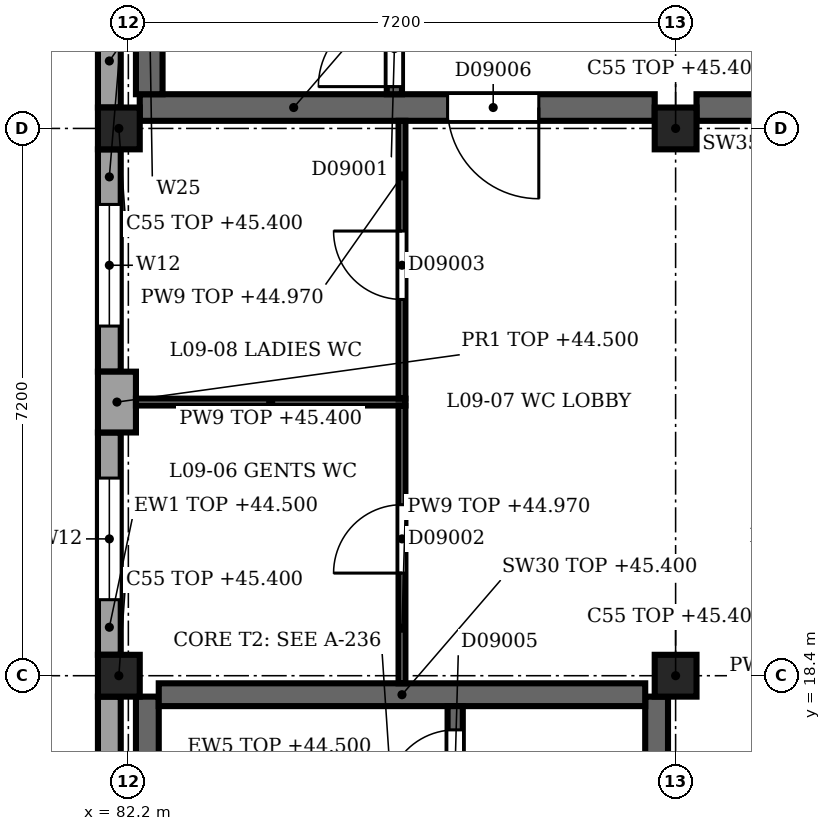
"""IFC4 building model, lengths in metres.
Left out: names, types, materials, properties, quantities, classifications, styles, units other than length and angle.
Written with IfcOpenShell. Run it as: python <this file> out.ifc"""

import sys

from ifc_helpers import new_model, si_unit, direction, frame, frame_2d, origin, origin_2d, place, context, subcontext, project, spatial, rectangle, extrude, element, fill, save


model = new_model("IFC4")
c1 = context("Model", 3, precision=1e-05, world=origin(), true_north=direction((0.0, 1.0)))
c2 = subcontext(c1, "Body", "Model", "MODEL_VIEW")
j1 = project(units=[si_unit("LENGTHUNIT", "METRE"), si_unit("PLANEANGLEUNIT", "RADIAN")], contexts=[c1])
p1 = place(None, origin())
s1 = spatial("IfcSite", under=j1, at=p1, CompositionType="ELEMENT")
p2 = place(p1, origin())
s2 = spatial("IfcBuilding", under=s1, at=p2, CompositionType="ELEMENT")
p3 = place(p2, frame((0.0, 0.0, 41.4)))
s3 = spatial("IfcBuildingStorey", under=s2, at=p3, CompositionType="ELEMENT", Elevation=41.4)
for number, where, z_axis, x_axis in (
    (1, (82.075, 18.4, 0.0), (0.0, 0.0, 1.0), (1.0, 0.0, 0.0)),
    (2, (82.075, 25.6, 0.0), (0.0, 0.0, 1.0), (1.0, 0.0, 0.0)),
    (3, (89.4, 18.4, 0.0), (0.0, 0.0, 1.0), (1.0, 0.0, 0.0)),
    (4, (89.4, 25.6, 0.0), (0.0, 0.0, 1.0), (1.0, 0.0, 0.0)),
):
    element("IfcColumn", number, at=place(p3, frame(where, z_axis=z_axis, x_axis=x_axis)), inside=s3, PredefinedType="COLUMN", context=c2, shape_type="SweptSolid", body=[
        extrude(rectangle(XDim=0.55, YDim=0.55, at=origin_2d()), origin(), (0.0, 0.0, 1.0), 4.0),
    ])
p4 = place(p3, frame((82.05, 21.6, 0.0), z_axis=(0.0, 0.0, 1.0), x_axis=(0.0, 1.0, 0.0)))
e5 = element("IfcWall", 5, at=p4, inside=s3, PredefinedType="SOLIDWALL", context=c2, shape_type="SweptSolid", body=[
    extrude(rectangle(XDim=0.8, YDim=0.5, at=frame_2d((0.4, 0.0))), origin(), (0.0, 0.0, 1.0), 3.1),
])
p5 = place(p3, frame((81.95, 15.2, 0.0), z_axis=(0.0, 0.0, 1.0), x_axis=(0.0, 1.0, 0.0)))
e6 = element("IfcWall", 6, at=p5, inside=s3, PredefinedType="SOLIDWALL", context=c2, shape_type="SweptSolid", body=[
    extrude(rectangle(XDim=2.925, YDim=0.3, at=frame_2d((1.462, 0.0))), origin(), (0.0, 0.0, 1.0), 3.1),
])
p6 = place(p3, frame((81.95, 18.675, 0.0), z_axis=(0.0, 0.0, 1.0), x_axis=(0.0, 1.0, 0.0)))
e7 = element("IfcWall", 7, at=p6, inside=s3, PredefinedType="SOLIDWALL", context=c2, shape_type="SweptSolid", body=[
    extrude(rectangle(XDim=2.925, YDim=0.3, at=frame_2d((1.462, 0.0))), origin(), (0.0, 0.0, 1.0), 3.1),
])
p7 = place(p6, frame((0.725, 0.0, 0.9)))
e8 = element("IfcOpeningElement", 8, at=p7, cuts=e7, PredefinedType="OPENING", context=c2, shape_type="SweptSolid", body=[
    extrude(rectangle(XDim=1.6, YDim=2.1, at=frame_2d((0.8, 1.05))), frame((0.0, 0.16, 0.0), z_axis=(0.0, -1.0, 0.0), x_axis=(1.0, 0.0, 0.0)), (0.0, 0.0, 1.0), 0.32),
])
p8 = place(p3, frame((81.95, 22.4, 0.0), z_axis=(0.0, 0.0, 1.0), x_axis=(0.0, 1.0, 0.0)))
e9 = element("IfcWall", 9, at=p8, inside=s3, PredefinedType="SOLIDWALL", context=c2, shape_type="SweptSolid", body=[
    extrude(rectangle(XDim=2.925, YDim=0.3, at=frame_2d((1.462, 0.0))), origin(), (0.0, 0.0, 1.0), 3.1),
])
p9 = place(p8, frame((0.6, 0.0, 0.9)))
e10 = element("IfcOpeningElement", 10, at=p9, cuts=e9, PredefinedType="OPENING", context=c2, shape_type="SweptSolid", body=[
    extrude(rectangle(XDim=1.6, YDim=2.1, at=frame_2d((0.8, 1.05))), frame((0.0, 0.16, 0.0), z_axis=(0.0, -1.0, 0.0), x_axis=(1.0, 0.0, 0.0)), (0.0, 0.0, 1.0), 0.32),
])
p10 = place(p3, frame((81.95, 25.875, 0.0), z_axis=(0.0, 0.0, 1.0), x_axis=(0.0, 1.0, 0.0)))
e11 = element("IfcWall", 11, at=p10, inside=s3, PredefinedType="SOLIDWALL", context=c2, shape_type="SweptSolid", body=[
    extrude(rectangle(XDim=2.925, YDim=0.3, at=frame_2d((1.462, 0.0))), origin(), (0.0, 0.0, 1.0), 3.1),
])
p11 = place(p10, frame((1.225, 0.0, 1.2)))
e12 = element("IfcOpeningElement", 12, at=p11, cuts=e11, PredefinedType="OPENING", context=c2, shape_type="SweptSolid", body=[
    extrude(rectangle(XDim=0.6, YDim=1.8, at=frame_2d((0.3, 0.9))), frame((0.0, 0.16, 0.0), z_axis=(0.0, -1.0, 0.0), x_axis=(1.0, 0.0, 0.0)), (0.0, 0.0, 1.0), 0.32),
])
p12 = place(p3, frame((82.35, 25.875, 0.0), z_axis=(0.0, 0.0, 1.0), x_axis=(1.0, 0.0, 0.0)))
e13 = element("IfcWall", 13, at=p12, inside=s3, PredefinedType="SHEAR", context=c2, shape_type="SweptSolid", body=[
    extrude(rectangle(XDim=6.775, YDim=0.35, at=frame_2d((3.387, 0.0))), origin(), (0.0, 0.0, 1.0), 4.0),
])
p13 = place(p12, frame((4.05, 0.0, 0.0)))
e14 = element("IfcOpeningElement", 14, at=p13, cuts=e13, PredefinedType="OPENING", context=c2, shape_type="SweptSolid", body=[
    extrude(rectangle(XDim=1.2, YDim=2.1, at=frame_2d((0.6, 1.05))), frame((0.0, 0.185, 0.0), z_axis=(0.0, -1.0, 0.0), x_axis=(1.0, 0.0, 0.0)), (0.0, 0.0, 1.0), 0.37),
])
p14 = place(p3, frame((89.675, 25.875, 0.0), z_axis=(0.0, 0.0, 1.0), x_axis=(1.0, 0.0, 0.0)))
e15 = element("IfcWall", 15, at=p14, inside=s3, PredefinedType="SHEAR", context=c2, shape_type="SweptSolid", body=[
    extrude(rectangle(XDim=6.65, YDim=0.35, at=frame_2d((3.325, 0.0))), origin(), (0.0, 0.0, 1.0), 4.0),
])
p15 = place(p14, frame((2.725, 0.0, 0.0)))
e16 = element("IfcOpeningElement", 16, at=p15, cuts=e15, PredefinedType="OPENING", context=c2, shape_type="SweptSolid", body=[
    extrude(rectangle(XDim=1.8, YDim=2.1, at=frame_2d((0.9, 1.05))), frame((0.0, 0.185, 0.0), z_axis=(0.0, -1.0, 0.0), x_axis=(1.0, 0.0, 0.0)), (0.0, 0.0, 1.0), 0.37),
])
p16 = place(p3, frame((82.475, 26.05, 0.0), z_axis=(0.0, 0.0, 1.0), x_axis=(0.0, 1.0, 0.0)))
e17 = element("IfcWall", 17, at=p16, inside=s3, PredefinedType="SHEAR", context=c2, shape_type="SweptSolid", body=[
    extrude(rectangle(XDim=6.3, YDim=0.35, at=frame_2d((3.15, 0.0))), origin(), (0.0, 0.0, 1.0), 4.0),
])
p17 = place(p16, frame((1.05, 0.0, 1.2)))
e18 = element("IfcOpeningElement", 18, at=p17, cuts=e17, PredefinedType="OPENING", context=c2, shape_type="SweptSolid", body=[
    extrude(rectangle(XDim=0.6, YDim=1.8, at=frame_2d((0.3, 0.9))), frame((0.0, 0.185, 0.0), z_axis=(0.0, -1.0, 0.0), x_axis=(1.0, 0.0, 0.0)), (0.0, 0.0, 1.0), 0.37),
])
p18 = place(p16, frame((4.65, 0.0, 1.2)))
e19 = element("IfcOpeningElement", 19, at=p18, cuts=e17, PredefinedType="OPENING", context=c2, shape_type="SweptSolid", body=[
    extrude(rectangle(XDim=0.6, YDim=1.8, at=frame_2d((0.3, 0.9))), frame((0.0, 0.185, 0.0), z_axis=(0.0, -1.0, 0.0), x_axis=(1.0, 0.0, 0.0)), (0.0, 0.0, 1.0), 0.37),
])
p19 = place(p3, frame((85.7, 26.05, 0.0), z_axis=(0.0, 0.0, 1.0), x_axis=(0.0, 1.0, 0.0)))
e20 = element("IfcWall", 20, at=p19, inside=s3, PredefinedType="SHEAR", context=c2, shape_type="SweptSolid", body=[
    extrude(rectangle(XDim=6.3, YDim=0.2, at=frame_2d((3.15, 0.0))), origin(), (0.0, 0.0, 1.0), 4.0),
])
p20 = place(p19, frame((0.1, 0.0, 0.0)))
e21 = element("IfcOpeningElement", 21, at=p20, cuts=e20, PredefinedType="OPENING", context=c2, shape_type="SweptSolid", body=[
    extrude(rectangle(XDim=1.0, YDim=2.1, at=frame_2d((0.5, 1.05))), frame((0.0, 0.11, 0.0), z_axis=(0.0, -1.0, 0.0), x_axis=(1.0, 0.0, 0.0)), (0.0, 0.0, 1.0), 0.22),
])
p21 = place(p3, frame((89.15, 11.475, 0.0), z_axis=(0.0, 0.0, 1.0), x_axis=(0.0, 1.0, 0.0)))
e22 = element("IfcWall", 22, at=p21, inside=s3, PredefinedType="SHEAR", context=c2, shape_type="SweptSolid", body=[
    extrude(rectangle(XDim=6.65, YDim=0.3, at=frame_2d((3.325, 0.0))), origin(), (0.0, 0.0, 1.0), 4.0),
])
p22 = place(p21, frame((4.325, 0.0, 0.0)))
e23 = element("IfcOpeningElement", 23, at=p22, cuts=e22, PredefinedType="OPENING", context=c2, shape_type="SweptSolid", body=[
    extrude(rectangle(XDim=1.2, YDim=2.1, at=frame_2d((0.6, 1.05))), frame((0.0, 0.16, 0.0), z_axis=(0.0, -1.0, 0.0), x_axis=(1.0, 0.0, 0.0)), (0.0, 0.0, 1.0), 0.32),
])
p23 = place(p3, frame((82.45, 11.475, 0.0), z_axis=(0.0, 0.0, 1.0), x_axis=(0.0, 1.0, 0.0)))
e24 = element("IfcWall", 24, at=p23, inside=s3, PredefinedType="SHEAR", context=c2, shape_type="SweptSolid", body=[
    extrude(rectangle(XDim=6.65, YDim=0.3, at=frame_2d((3.325, 0.0))), origin(), (0.0, 0.0, 1.0), 4.0),
])
p24 = place(p23, frame((1.225, 0.0, 1.2)))
e25 = element("IfcOpeningElement", 25, at=p24, cuts=e24, PredefinedType="OPENING", context=c2, shape_type="SweptSolid", body=[
    extrude(rectangle(XDim=0.6, YDim=1.8, at=frame_2d((0.3, 0.9))), frame((0.0, 0.16, 0.0), z_axis=(0.0, -1.0, 0.0), x_axis=(1.0, 0.0, 0.0)), (0.0, 0.0, 1.0), 0.32),
])
p25 = place(p3, frame((82.6, 18.15, 0.0), z_axis=(0.0, 0.0, 1.0), x_axis=(1.0, 0.0, 0.0)))
e26 = element("IfcWall", 26, at=p25, inside=s3, PredefinedType="SHEAR", context=c2, shape_type="SweptSolid", body=[
    extrude(rectangle(XDim=6.4, YDim=0.3, at=frame_2d((3.2, 0.0))), origin(), (0.0, 0.0, 1.0), 4.0),
])
p26 = place(p3, frame((86.5, 18.0, 0.0), z_axis=(0.0, 0.0, 1.0), x_axis=(0.0, -1.0, 0.0)))
e27 = element("IfcWall", 27, at=p26, inside=s3, PredefinedType="SHEAR", context=c2, shape_type="SweptSolid", body=[
    extrude(rectangle(XDim=3.25, YDim=0.2, at=frame_2d((1.625, 0.0))), origin(), (0.0, 0.0, 1.0), 4.0),
])
p27 = place(p26, frame((2.038, 0.0, 0.0)))
e28 = element("IfcOpeningElement", 28, at=p27, cuts=e27, PredefinedType="OPENING", context=c2, shape_type="SweptSolid", body=[
    extrude(rectangle(XDim=0.9, YDim=2.1, at=frame_2d((0.45, 1.05))), frame((0.0, 0.11, 0.0), z_axis=(0.0, -1.0, 0.0), x_axis=(1.0, 0.0, 0.0)), (0.0, 0.0, 1.0), 0.22),
])
p28 = place(p26, frame((0.312, 0.0, 0.0)))
e29 = element("IfcOpeningElement", 29, at=p28, cuts=e27, PredefinedType="OPENING", context=c2, shape_type="SweptSolid", body=[
    extrude(rectangle(XDim=0.9, YDim=2.1, at=frame_2d((0.45, 1.05))), frame((0.0, 0.11, 0.0), z_axis=(0.0, -1.0, 0.0), x_axis=(1.0, 0.0, 0.0)), (0.0, 0.0, 1.0), 0.22),
])
p29 = place(p3, frame((82.3, 22.0, 0.0), z_axis=(0.0, 0.0, 1.0), x_axis=(1.0, 0.0, 0.0)))
e30 = element("IfcWall", 30, at=p29, inside=s3, PredefinedType="PARTITIONING", context=c2, shape_type="SweptSolid", body=[
    extrude(rectangle(XDim=3.545, YDim=0.09, at=frame_2d((1.772, 0.0))), origin(), (0.0, 0.0, 1.0), 4.0),
])
p30 = place(p3, frame((85.8, 18.3, 0.0), z_axis=(0.0, 0.0, 1.0), x_axis=(0.0, 1.0, 0.0)))
e31 = element("IfcWall", 31, at=p30, inside=s3, PredefinedType="PARTITIONING", context=c2, shape_type="SweptSolid", body=[
    extrude(rectangle(XDim=3.655, YDim=0.09, at=frame_2d((1.828, 0.0))), origin(), (0.0, 0.0, 1.0), 3.57),
])
p31 = place(p30, frame((1.45, 0.0, 0.0)))
e32 = element("IfcOpeningElement", 32, at=p31, cuts=e31, PredefinedType="OPENING", context=c2, shape_type="SweptSolid", body=[
    extrude(rectangle(XDim=0.9, YDim=2.1, at=frame_2d((0.45, 1.05))), frame((0.0, 0.055, 0.0), z_axis=(0.0, -1.0, 0.0), x_axis=(1.0, 0.0, 0.0)), (0.0, 0.0, 1.0), 0.11),
])
p32 = place(p3, frame((85.8, 22.045, 0.0), z_axis=(0.0, 0.0, 1.0), x_axis=(0.0, 1.0, 0.0)))
e33 = element("IfcWall", 33, at=p32, inside=s3, PredefinedType="PARTITIONING", context=c2, shape_type="SweptSolid", body=[
    extrude(rectangle(XDim=3.655, YDim=0.09, at=frame_2d((1.828, 0.0))), origin(), (0.0, 0.0, 1.0), 3.57),
])
p33 = place(p32, frame((1.305, 0.0, 0.0)))
e34 = element("IfcOpeningElement", 34, at=p33, cuts=e33, PredefinedType="OPENING", context=c2, shape_type="SweptSolid", body=[
    extrude(rectangle(XDim=0.9, YDim=2.1, at=frame_2d((0.45, 1.05))), frame((0.0, 0.055, 0.0), z_axis=(0.0, -1.0, 0.0), x_axis=(1.0, 0.0, 0.0)), (0.0, 0.0, 1.0), 0.11),
])
p34 = place(p7, origin())
e35 = element("IfcWindow", 35, at=p34, inside=s3, PartitioningType="SINGLE_PANEL", PredefinedType="WINDOW", context=c2, shape_type="SweptSolid", body=[
    extrude(rectangle(XDim=1.6, YDim=2.1, at=frame_2d((0.8, 1.05))), frame((0.0, 0.03, 0.0), z_axis=(0.0, -1.0, 0.0), x_axis=(1.0, 0.0, 0.0)), (0.0, 0.0, 1.0), 0.06),
])
fill(e8, e35)
p35 = place(p9, origin())
e36 = element("IfcWindow", 36, at=p35, inside=s3, PartitioningType="SINGLE_PANEL", PredefinedType="WINDOW", context=c2, shape_type="SweptSolid", body=[
    extrude(rectangle(XDim=1.6, YDim=2.1, at=frame_2d((0.8, 1.05))), frame((0.0, 0.03, 0.0), z_axis=(0.0, -1.0, 0.0), x_axis=(1.0, 0.0, 0.0)), (0.0, 0.0, 1.0), 0.06),
])
fill(e10, e36)
p36 = place(p13, origin())
e37 = element("IfcDoor", 37, at=p36, inside=s3, OperationType="SINGLE_SWING_RIGHT", PredefinedType="DOOR", context=c2, shape_type="SweptSolid", body=[
    extrude(rectangle(XDim=1.2, YDim=2.1, at=frame_2d((0.6, 1.05))), frame((0.0, 0.025, 0.0), z_axis=(0.0, -1.0, 0.0), x_axis=(1.0, 0.0, 0.0)), (0.0, 0.0, 1.0), 0.05),
])
fill(e14, e37)
p37 = place(p20, origin())
e38 = element("IfcDoor", 38, at=p37, inside=s3, OperationType="SINGLE_SWING_LEFT", PredefinedType="DOOR", context=c2, shape_type="SweptSolid", body=[
    extrude(rectangle(XDim=1.0, YDim=2.1, at=frame_2d((0.5, 1.05))), frame((0.0, 0.025, 0.0), z_axis=(0.0, -1.0, 0.0), x_axis=(1.0, 0.0, 0.0)), (0.0, 0.0, 1.0), 0.05),
])
fill(e21, e38)
p38 = place(p28, origin())
e39 = element("IfcDoor", 39, at=p38, inside=s3, OperationType="SINGLE_SWING_LEFT", PredefinedType="DOOR", context=c2, shape_type="SweptSolid", body=[
    extrude(rectangle(XDim=0.9, YDim=2.1, at=frame_2d((0.45, 1.05))), frame((0.0, 0.025, 0.0), z_axis=(0.0, -1.0, 0.0), x_axis=(1.0, 0.0, 0.0)), (0.0, 0.0, 1.0), 0.05),
])
fill(e29, e39)
p39 = place(p31, origin())
e40 = element("IfcDoor", 40, at=p39, inside=s3, OperationType="SINGLE_SWING_RIGHT", PredefinedType="DOOR", context=c2, shape_type="SweptSolid", body=[
    extrude(rectangle(XDim=0.9, YDim=2.1, at=frame_2d((0.45, 1.05))), frame((0.0, 0.025, 0.0), z_axis=(0.0, -1.0, 0.0), x_axis=(1.0, 0.0, 0.0)), (0.0, 0.0, 1.0), 0.05),
])
fill(e32, e40)
p40 = place(p33, origin())
e41 = element("IfcDoor", 41, at=p40, inside=s3, OperationType="SINGLE_SWING_LEFT", PredefinedType="DOOR", context=c2, shape_type="SweptSolid", body=[
    extrude(rectangle(XDim=0.9, YDim=2.1, at=frame_2d((0.45, 1.05))), frame((0.0, 0.025, 0.0), z_axis=(0.0, -1.0, 0.0), x_axis=(1.0, 0.0, 0.0)), (0.0, 0.0, 1.0), 0.05),
])
fill(e34, e41)
save(model, sys.argv[1])
